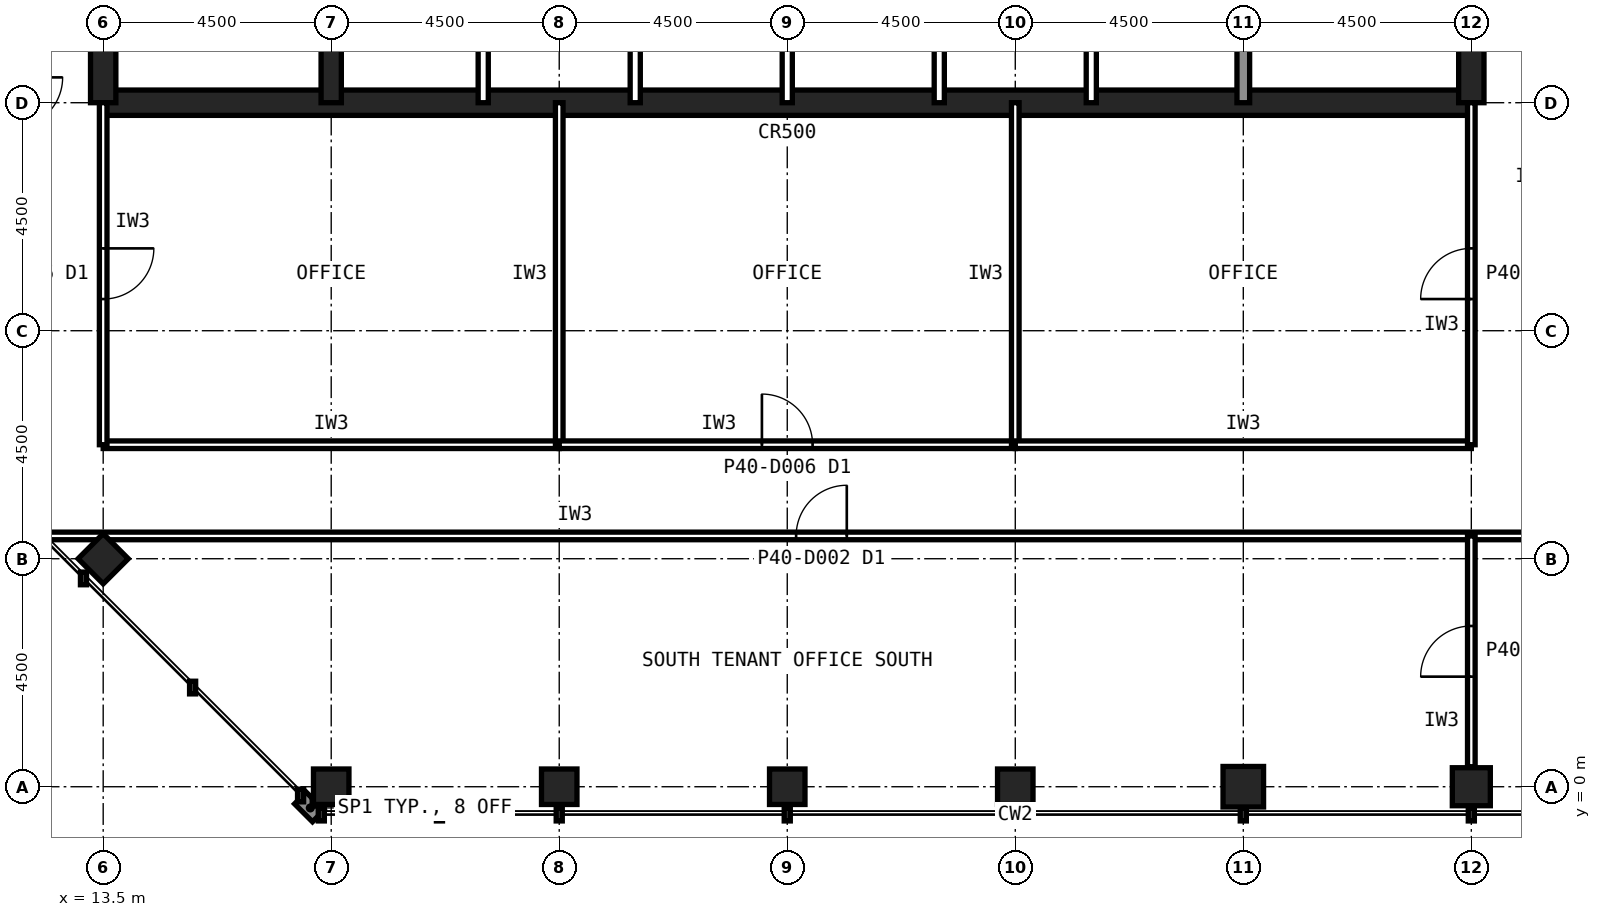
"""IFC4 building model, lengths in metres.
Left out: names, types, materials, properties, quantities, classifications, styles, units other than length and angle.
Written with IfcOpenShell. Run it as: python <this file> out.ifc"""

import sys

from ifc_helpers import new_model, si_unit, direction, frame, frame_2d, origin, origin_2d, place, context, subcontext, project, spatial, rectangle, hollow_rectangle, extrude, element, fill, save


model = new_model("IFC4")
c1 = context("Model", 3, precision=1e-05, world=origin(), true_north=direction((0.0, 1.0)))
c2 = subcontext(c1, "Body", "Model", "MODEL_VIEW")
j1 = project(units=[si_unit("LENGTHUNIT", "METRE"), si_unit("PLANEANGLEUNIT", "RADIAN")], contexts=[c1])
p1 = place(None, origin())
s1 = spatial("IfcSite", under=j1, at=p1, CompositionType="ELEMENT")
p2 = place(p1, origin())
s2 = spatial("IfcBuilding", under=s1, at=p2, CompositionType="ELEMENT")
p3 = place(p2, frame((0.0, 0.0, 167.6)))
s3 = spatial("IfcBuildingStorey", under=s2, at=p3, CompositionType="ELEMENT", Elevation=167.6)
for number, where, z_axis, x_axis in (
    (1, (18.0, 0.0, 0.0), (0.0, 0.0, 1.0), (1.0, 0.0, 0.0)),
    (2, (22.5, 0.0, 0.0), (0.0, 0.0, 1.0), (1.0, 0.0, 0.0)),
    (3, (27.0, 0.0, 0.0), (0.0, 0.0, 1.0), (1.0, 0.0, 0.0)),
    (4, (31.5, 0.0, 0.0), (0.0, 0.0, 1.0), (1.0, 0.0, 0.0)),
):
    element("IfcColumn", number, at=place(p3, frame(where, z_axis=z_axis, x_axis=x_axis)), inside=s3, PredefinedType="COLUMN", context=c2, shape_type="SweptSolid", body=[
        extrude(hollow_rectangle(XDim=0.7, YDim=0.7, WallThickness=0.036, at=origin_2d()), origin(), (0.0, 0.0, 1.0), 4.0),
    ])
p4 = place(p3, frame((36.0, 0.0, 0.0), z_axis=(0.0, 0.0, 1.0), x_axis=(1.0, 0.0, 0.0)))
e5 = element("IfcColumn", 5, at=p4, inside=s3, PredefinedType="COLUMN", context=c2, shape_type="SweptSolid", body=[
    extrude(hollow_rectangle(XDim=0.8, YDim=0.8, WallThickness=0.045, at=origin_2d()), origin(), (0.0, 0.0, 1.0), 4.0),
])
p5 = place(p3, frame((40.5, 0.0, 0.0), z_axis=(0.0, 0.0, 1.0), x_axis=(1.0, 0.0, 0.0)))
e6 = element("IfcColumn", 6, at=p5, inside=s3, PredefinedType="COLUMN", context=c2, shape_type="SweptSolid", body=[
    extrude(hollow_rectangle(XDim=0.75, YDim=0.75, WallThickness=0.04, at=origin_2d()), origin(), (0.0, 0.0, 1.0), 4.0),
])
p6 = place(p3, frame((13.5, 4.5, 0.0), z_axis=(0.0, 0.0, 1.0), x_axis=(0.707106781187, 0.707106781187, 0.0)))
e7 = element("IfcColumn", 7, at=p6, inside=s3, PredefinedType="COLUMN", context=c2, shape_type="SweptSolid", body=[
    extrude(hollow_rectangle(XDim=0.7, YDim=0.7, WallThickness=0.036, at=origin_2d()), origin(), (0.0, 0.0, 1.0), 4.0),
])
p7 = place(p3, frame((13.5, 13.5, 0.0), z_axis=(0.0, 0.0, 1.0), x_axis=(1.0, 0.0, 0.0)))
e8 = element("IfcWall", 8, at=p7, inside=s3, PredefinedType="SHEAR", context=c2, shape_type="SweptSolid", body=[
    extrude(rectangle(XDim=27.0, YDim=0.5, at=frame_2d((13.5, 0.0))), origin(), (0.0, 0.0, 1.0), 4.0),
])
p8 = place(p3, frame((40.5, 13.5, 0.0), z_axis=(0.0, 0.0, 1.0), x_axis=(0.0, 1.0, 0.0)))
e9 = element("IfcWall", 9, at=p8, inside=s3, PredefinedType="SHEAR", context=c2, shape_type="SweptSolid", body=[
    extrude(rectangle(XDim=27.0, YDim=0.5, at=frame_2d((13.5, 0.0))), origin(), (0.0, 0.0, 1.0), 4.0),
])
p9 = place(p8, frame((5.85, 0.0, 0.0)))
e10 = element("IfcOpeningElement", 10, at=p9, cuts=e9, PredefinedType="OPENING", context=c2, shape_type="SweptSolid", body=[
    extrude(rectangle(XDim=1.8, YDim=2.1, at=frame_2d((0.9, 1.05))), frame((0.0, 0.26, 0.0), z_axis=(0.0, -1.0, 0.0), x_axis=(1.0, 0.0, 0.0)), (0.0, 0.0, 1.0), 0.52),
])
p10 = place(p8, frame((19.65, 0.0, 0.0)))
e11 = element("IfcOpeningElement", 11, at=p10, cuts=e9, PredefinedType="OPENING", context=c2, shape_type="SweptSolid", body=[
    extrude(rectangle(XDim=1.2, YDim=2.1, at=frame_2d((0.6, 1.05))), frame((0.0, 0.26, 0.0), z_axis=(0.0, -1.0, 0.0), x_axis=(1.0, 0.0, 0.0)), (0.0, 0.0, 1.0), 0.52),
])
p11 = place(p3, frame((13.5, 40.5, 0.0), z_axis=(0.0, 0.0, 1.0), x_axis=(0.0, -1.0, 0.0)))
e12 = element("IfcWall", 12, at=p11, inside=s3, PredefinedType="SHEAR", context=c2, shape_type="SweptSolid", body=[
    extrude(rectangle(XDim=27.0, YDim=0.5, at=frame_2d((13.5, 0.0))), origin(), (0.0, 0.0, 1.0), 4.0),
])
p12 = place(p11, frame((19.65, 0.0, 0.0)))
e13 = element("IfcOpeningElement", 13, at=p12, cuts=e12, PredefinedType="OPENING", context=c2, shape_type="SweptSolid", body=[
    extrude(rectangle(XDim=1.2, YDim=2.1, at=frame_2d((0.6, 1.05))), frame((0.0, 0.26, 0.0), z_axis=(0.0, -1.0, 0.0), x_axis=(1.0, 0.0, 0.0)), (0.0, 0.0, 1.0), 0.52),
])
p13 = place(p11, frame((5.85, 0.0, 0.0)))
e14 = element("IfcOpeningElement", 14, at=p13, cuts=e12, PredefinedType="OPENING", context=c2, shape_type="SweptSolid", body=[
    extrude(rectangle(XDim=1.8, YDim=2.1, at=frame_2d((0.9, 1.05))), frame((0.0, 0.26, 0.0), z_axis=(0.0, -1.0, 0.0), x_axis=(1.0, 0.0, 0.0)), (0.0, 0.0, 1.0), 0.52),
])
p14 = place(p3, frame((18.0, 13.5, 0.0), z_axis=(0.0, 0.0, 1.0), x_axis=(0.0, 1.0, 0.0)))
e15 = element("IfcWall", 15, at=p14, inside=s3, PredefinedType="SHEAR", context=c2, shape_type="SweptSolid", body=[
    extrude(rectangle(XDim=18.0, YDim=0.4, at=frame_2d((9.0, 0.0))), origin(), (0.0, 0.0, 1.0), 4.0),
])
p15 = place(p3, frame((36.0, 13.5, 0.0), z_axis=(0.0, 0.0, 1.0), x_axis=(0.0, 1.0, 0.0)))
e16 = element("IfcWall", 16, at=p15, inside=s3, PredefinedType="SOLIDWALL", context=c2, shape_type="SweptSolid", body=[
    extrude(rectangle(XDim=4.5, YDim=0.25, at=frame_2d((2.25, 0.0))), origin(), (0.0, 0.0, 1.0), 3.84),
])
for number, where, z_axis, x_axis in (
    (17, (21.0, 13.5, 0.0), (0.0, 0.0, 1.0), (0.0, 1.0, 0.0)),
    (18, (24.0, 13.5, 0.0), (0.0, 0.0, 1.0), (0.0, 1.0, 0.0)),
    (19, (27.0, 13.5, 0.0), (0.0, 0.0, 1.0), (0.0, 1.0, 0.0)),
    (20, (30.0, 13.5, 0.0), (0.0, 0.0, 1.0), (0.0, 1.0, 0.0)),
    (21, (33.0, 13.5, 0.0), (0.0, 0.0, 1.0), (0.0, 1.0, 0.0)),
):
    element("IfcWall", number, at=place(p3, frame(where, z_axis=z_axis, x_axis=x_axis)), inside=s3, PredefinedType="PARTITIONING", context=c2, shape_type="SweptSolid", body=[
        extrude(rectangle(XDim=4.5, YDim=0.2, at=frame_2d((2.25, 0.0))), origin(), (0.0, 0.0, 1.0), 3.84),
    ])
p16 = place(p3, frame((12.315, 4.95, 0.0), z_axis=(0.0, 0.0, 1.0), x_axis=(1.0, 0.0, 0.0)))
e22 = element("IfcWall", 22, at=p16, inside=s3, PredefinedType="PARTITIONING", context=c2, shape_type="SweptSolid", body=[
    extrude(rectangle(XDim=29.985, YDim=0.15, at=frame_2d((14.993, 0.0))), origin(), (0.0, 0.0, 1.0), 3.84),
])
p17 = place(p16, frame((14.86, 0.0, 0.0)))
e23 = element("IfcOpeningElement", 23, at=p17, cuts=e22, PredefinedType="OPENING", context=c2, shape_type="SweptSolid", body=[
    extrude(rectangle(XDim=1.0, YDim=2.1, at=frame_2d((0.5, 1.05))), frame((0.0, 0.085, 0.0), z_axis=(0.0, -1.0, 0.0), x_axis=(1.0, 0.0, 0.0)), (0.0, 0.0, 1.0), 0.17),
])
p18 = place(p3, frame((13.5, 6.75, 0.0), z_axis=(0.0, 0.0, 1.0), x_axis=(1.0, 0.0, 0.0)))
e24 = element("IfcWall", 24, at=p18, inside=s3, PredefinedType="PARTITIONING", context=c2, shape_type="SweptSolid", body=[
    extrude(rectangle(XDim=9.0, YDim=0.15, at=frame_2d((4.5, 0.0))), origin(), (0.0, 0.0, 1.0), 3.84),
])
p19 = place(p3, frame((22.5, 6.75, 0.0), z_axis=(0.0, 0.0, 1.0), x_axis=(0.0, 1.0, 0.0)))
e25 = element("IfcWall", 25, at=p19, inside=s3, PredefinedType="PARTITIONING", context=c2, shape_type="SweptSolid", body=[
    extrude(rectangle(XDim=6.75, YDim=0.15, at=frame_2d((3.375, 0.0))), origin(), (0.0, 0.0, 1.0), 2.989),
])
p20 = place(p3, frame((13.5, 13.5, 0.0), z_axis=(0.0, 0.0, 1.0), x_axis=(0.0, -1.0, 0.0)))
e26 = element("IfcWall", 26, at=p20, inside=s3, PredefinedType="PARTITIONING", context=c2, shape_type="SweptSolid", body=[
    extrude(rectangle(XDim=6.75, YDim=0.15, at=frame_2d((3.375, 0.0))), origin(), (0.0, 0.0, 1.0), 2.989),
])
p21 = place(p20, frame((2.875, 0.0, 0.0)))
e27 = element("IfcOpeningElement", 27, at=p21, cuts=e26, PredefinedType="OPENING", context=c2, shape_type="SweptSolid", body=[
    extrude(rectangle(XDim=1.0, YDim=2.1, at=frame_2d((0.5, 1.05))), frame((0.0, 0.085, 0.0), z_axis=(0.0, -1.0, 0.0), x_axis=(1.0, 0.0, 0.0)), (0.0, 0.0, 1.0), 0.17),
])
p22 = place(p3, frame((22.5, 6.75, 0.0), z_axis=(0.0, 0.0, 1.0), x_axis=(1.0, 0.0, 0.0)))
e28 = element("IfcWall", 28, at=p22, inside=s3, PredefinedType="PARTITIONING", context=c2, shape_type="SweptSolid", body=[
    extrude(rectangle(XDim=9.0, YDim=0.15, at=frame_2d((4.5, 0.0))), origin(), (0.0, 0.0, 1.0), 3.84),
])
p23 = place(p22, frame((4.0, 0.0, 0.0)))
e29 = element("IfcOpeningElement", 29, at=p23, cuts=e28, PredefinedType="OPENING", context=c2, shape_type="SweptSolid", body=[
    extrude(rectangle(XDim=1.0, YDim=2.1, at=frame_2d((0.5, 1.05))), frame((0.0, 0.085, 0.0), z_axis=(0.0, -1.0, 0.0), x_axis=(1.0, 0.0, 0.0)), (0.0, 0.0, 1.0), 0.17),
])
p24 = place(p3, frame((31.5, 6.75, 0.0), z_axis=(0.0, 0.0, 1.0), x_axis=(0.0, 1.0, 0.0)))
e30 = element("IfcWall", 30, at=p24, inside=s3, PredefinedType="PARTITIONING", context=c2, shape_type="SweptSolid", body=[
    extrude(rectangle(XDim=6.75, YDim=0.15, at=frame_2d((3.375, 0.0))), origin(), (0.0, 0.0, 1.0), 2.989),
])
p25 = place(p3, frame((31.5, 6.75, 0.0), z_axis=(0.0, 0.0, 1.0), x_axis=(1.0, 0.0, 0.0)))
e31 = element("IfcWall", 31, at=p25, inside=s3, PredefinedType="PARTITIONING", context=c2, shape_type="SweptSolid", body=[
    extrude(rectangle(XDim=9.0, YDim=0.15, at=frame_2d((4.5, 0.0))), origin(), (0.0, 0.0, 1.0), 3.84),
])
p26 = place(p3, frame((40.5, 6.75, 0.0), z_axis=(0.0, 0.0, 1.0), x_axis=(0.0, 1.0, 0.0)))
e32 = element("IfcWall", 32, at=p26, inside=s3, PredefinedType="PARTITIONING", context=c2, shape_type="SweptSolid", body=[
    extrude(rectangle(XDim=6.75, YDim=0.15, at=frame_2d((3.375, 0.0))), origin(), (0.0, 0.0, 1.0), 2.989),
])
p27 = place(p26, frame((2.875, 0.0, 0.0)))
e33 = element("IfcOpeningElement", 33, at=p27, cuts=e32, PredefinedType="OPENING", context=c2, shape_type="SweptSolid", body=[
    extrude(rectangle(XDim=1.0, YDim=2.1, at=frame_2d((0.5, 1.05))), frame((0.0, 0.085, 0.0), z_axis=(0.0, -1.0, 0.0), x_axis=(1.0, 0.0, 0.0)), (0.0, 0.0, 1.0), 0.17),
])
p28 = place(p3, frame((40.5, 0.395, 0.0), z_axis=(0.0, 0.0, 1.0), x_axis=(0.0, 1.0, 0.0)))
e34 = element("IfcWall", 34, at=p28, inside=s3, PredefinedType="PARTITIONING", context=c2, shape_type="SweptSolid", body=[
    extrude(rectangle(XDim=4.555, YDim=0.15, at=frame_2d((2.277, 0.0))), origin(), (0.0, 0.0, 1.0), 2.989),
])
p29 = place(p28, frame((1.778, 0.0, 0.0)))
e35 = element("IfcOpeningElement", 35, at=p29, cuts=e34, PredefinedType="OPENING", context=c2, shape_type="SweptSolid", body=[
    extrude(rectangle(XDim=1.0, YDim=2.1, at=frame_2d((0.5, 1.05))), frame((0.0, 0.085, 0.0), z_axis=(0.0, -1.0, 0.0), x_axis=(1.0, 0.0, 0.0)), (0.0, 0.0, 1.0), 0.17),
])
p30 = place(p17, origin())
e36 = element("IfcDoor", 36, at=p30, inside=s3, OperationType="SINGLE_SWING_RIGHT", PredefinedType="DOOR", context=c2, shape_type="SweptSolid", body=[
    extrude(rectangle(XDim=1.0, YDim=2.1, at=frame_2d((0.5, 1.05))), frame((0.0, 0.025, 0.0), z_axis=(0.0, -1.0, 0.0), x_axis=(1.0, 0.0, 0.0)), (0.0, 0.0, 1.0), 0.05),
])
fill(e23, e36)
p31 = place(p21, origin())
e37 = element("IfcDoor", 37, at=p31, inside=s3, OperationType="SINGLE_SWING_LEFT", PredefinedType="DOOR", context=c2, shape_type="SweptSolid", body=[
    extrude(rectangle(XDim=1.0, YDim=2.1, at=frame_2d((0.5, 1.05))), frame((0.0, 0.025, 0.0), z_axis=(0.0, -1.0, 0.0), x_axis=(1.0, 0.0, 0.0)), (0.0, 0.0, 1.0), 0.05),
])
fill(e27, e37)
p32 = place(p23, origin())
e38 = element("IfcDoor", 38, at=p32, inside=s3, OperationType="SINGLE_SWING_LEFT", PredefinedType="DOOR", context=c2, shape_type="SweptSolid", body=[
    extrude(rectangle(XDim=1.0, YDim=2.1, at=frame_2d((0.5, 1.05))), frame((0.0, 0.025, 0.0), z_axis=(0.0, -1.0, 0.0), x_axis=(1.0, 0.0, 0.0)), (0.0, 0.0, 1.0), 0.05),
])
fill(e29, e38)
p33 = place(p27, origin())
e39 = element("IfcDoor", 39, at=p33, inside=s3, OperationType="SINGLE_SWING_LEFT", PredefinedType="DOOR", context=c2, shape_type="SweptSolid", body=[
    extrude(rectangle(XDim=1.0, YDim=2.1, at=frame_2d((0.5, 1.05))), frame((0.0, 0.025, 0.0), z_axis=(0.0, -1.0, 0.0), x_axis=(1.0, 0.0, 0.0)), (0.0, 0.0, 1.0), 0.05),
])
fill(e33, e39)
p34 = place(p29, origin())
e40 = element("IfcDoor", 40, at=p34, inside=s3, OperationType="SINGLE_SWING_LEFT", PredefinedType="DOOR", context=c2, shape_type="SweptSolid", body=[
    extrude(rectangle(XDim=1.0, YDim=2.1, at=frame_2d((0.5, 1.05))), frame((0.0, 0.025, 0.0), z_axis=(0.0, -1.0, 0.0), x_axis=(1.0, 0.0, 0.0)), (0.0, 0.0, 1.0), 0.05),
])
fill(e35, e40)
save(model, sys.argv[1])
